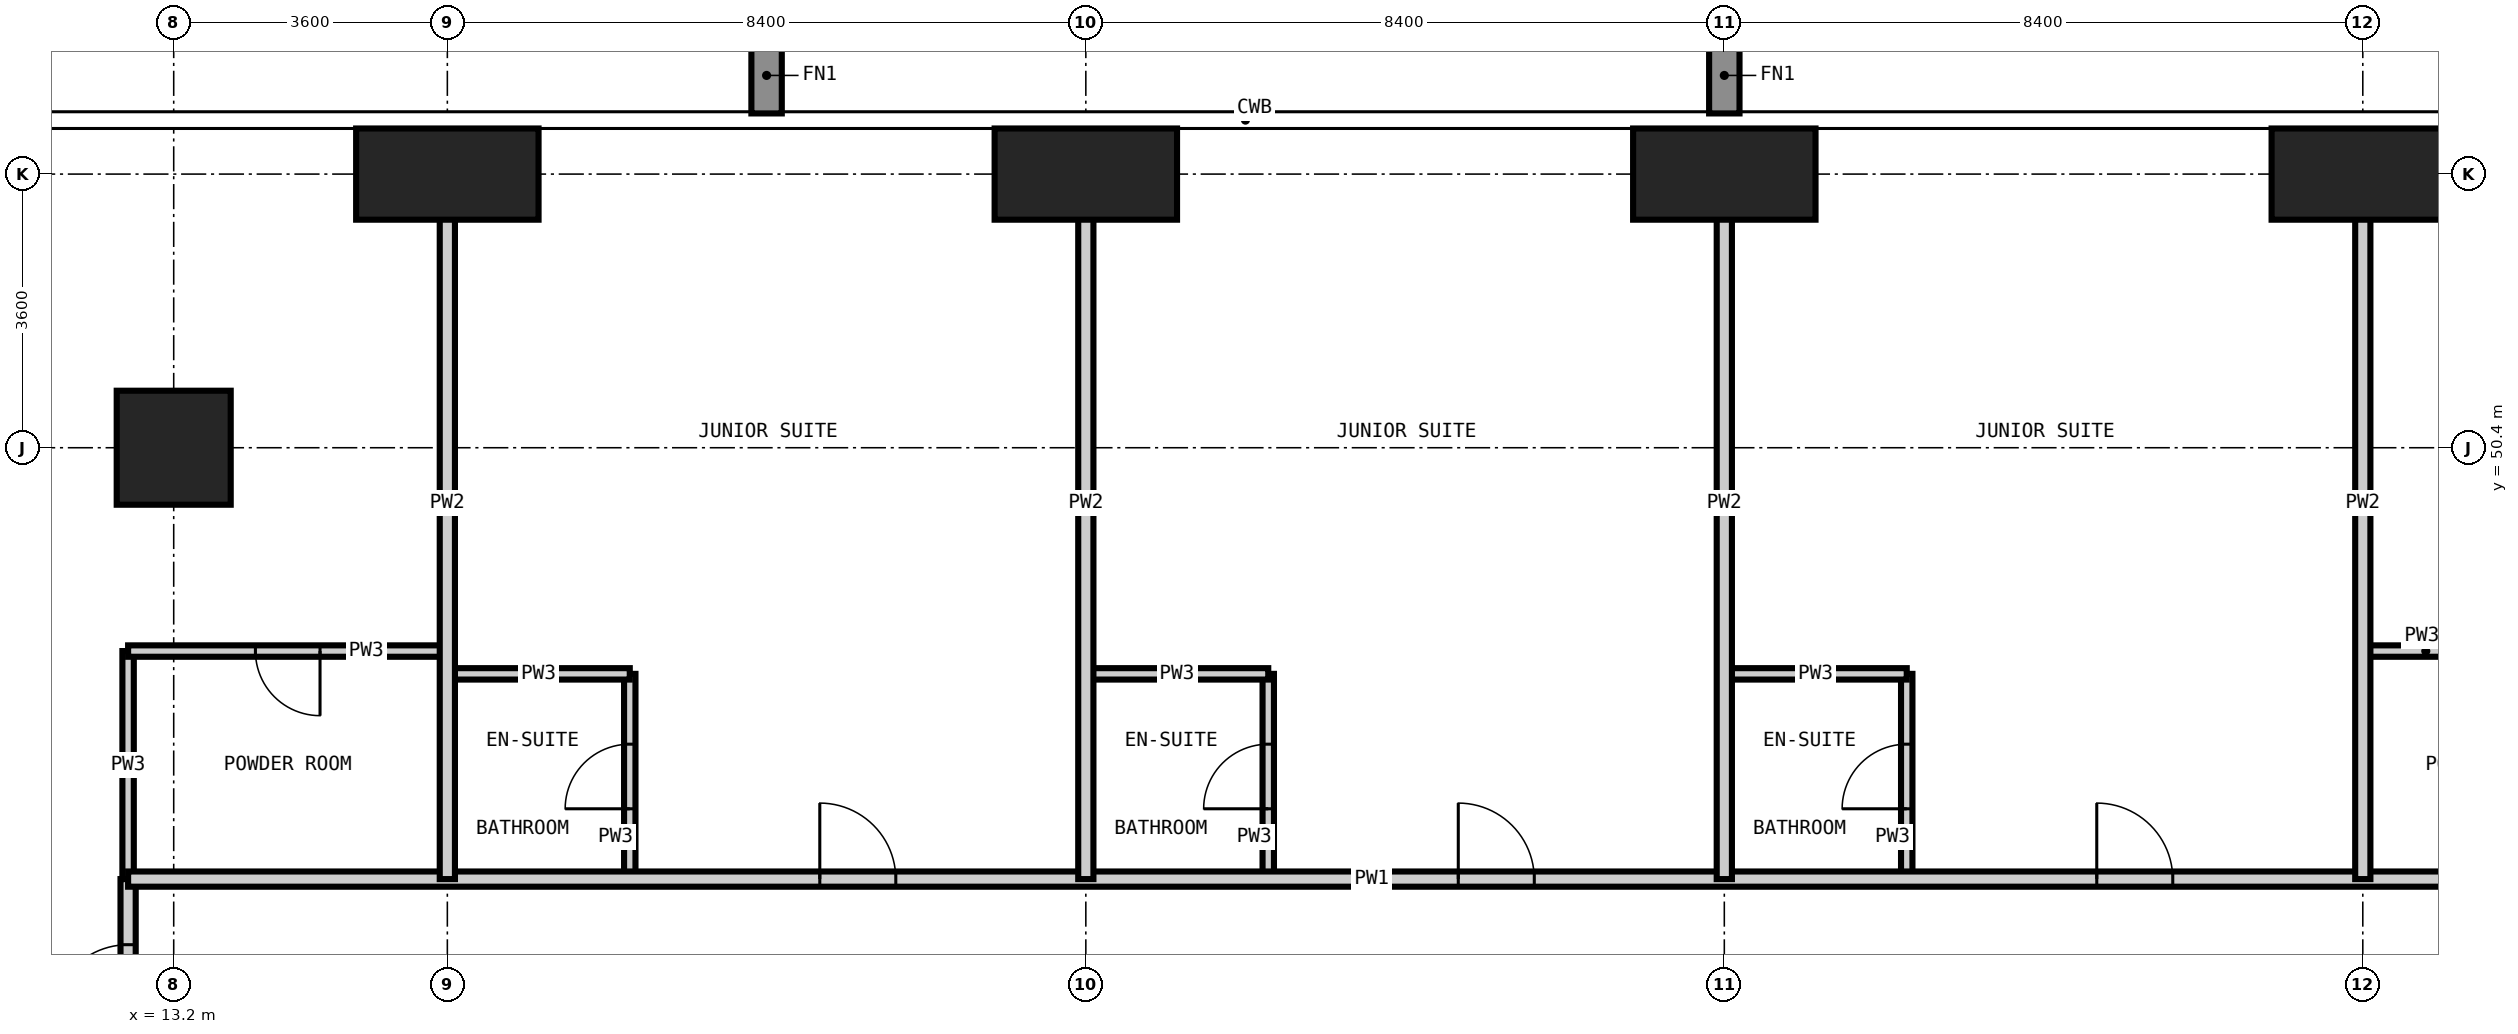
"""IFC4 building model, lengths in metres.
Left out: names, types, materials, properties, quantities, classifications, styles, units other than length and angle.
Written with IfcOpenShell. Run it as: python <this file> out.ifc"""

import sys

from ifc_helpers import new_model, si_unit, direction, frame, frame_2d, origin, origin_2d, place, context, subcontext, project, spatial, rectangle, extrude, element, fill, save


model = new_model("IFC4")
c1 = context("Model", 3, precision=1e-05, world=origin(), true_north=direction((0.0, 1.0)))
c2 = subcontext(c1, "Body", "Model", "MODEL_VIEW")
j1 = project(units=[si_unit("LENGTHUNIT", "METRE"), si_unit("PLANEANGLEUNIT", "RADIAN")], contexts=[c1])
p1 = place(None, origin())
s1 = spatial("IfcSite", under=j1, at=p1, CompositionType="ELEMENT")
p2 = place(p1, origin())
s2 = spatial("IfcBuilding", under=s1, at=p2, CompositionType="ELEMENT")
p3 = place(p2, frame((0.0, 0.0, 111.6)))
s3 = spatial("IfcBuildingStorey", under=s2, at=p3, CompositionType="ELEMENT", Elevation=111.6)
p4 = place(p3, frame((13.2, 50.4, -0.35), z_axis=(0.0, 0.0, 1.0), x_axis=(1.0, 0.0, 0.0)))
e1 = element("IfcColumn", 1, at=p4, inside=s3, PredefinedType="COLUMN", context=c2, shape_type="SweptSolid", body=[
    extrude(rectangle(XDim=1.5, YDim=1.5, at=origin_2d()), origin(), (0.0, 0.0, 1.0), 3.6),
])
for number, where, z_axis, x_axis in (
    (2, (16.8, 54.0, -0.35), (0.0, 0.0, 1.0), (1.0, 0.0, 0.0)),
    (3, (25.2, 54.0, -0.35), (0.0, 0.0, 1.0), (1.0, 0.0, 0.0)),
    (4, (33.6, 54.0, -0.35), (0.0, 0.0, 1.0), (1.0, 0.0, 0.0)),
    (5, (42.0, 54.0, -0.35), (0.0, 0.0, 1.0), (1.0, 0.0, 0.0)),
):
    element("IfcColumn", number, at=place(p3, frame(where, z_axis=z_axis, x_axis=x_axis)), inside=s3, PredefinedType="COLUMN", context=c2, shape_type="SweptSolid", body=[
        extrude(rectangle(XDim=2.4, YDim=1.2, at=origin_2d()), origin(), (0.0, 0.0, 1.0), 3.6),
    ])
p5 = place(p3, frame((12.6, 44.725, 0.0), z_axis=(0.0, 0.0, 1.0), x_axis=(0.0, 1.0, 0.0)))
e6 = element("IfcWall", 6, at=p5, inside=s3, PredefinedType="PARTITIONING", context=c2, shape_type="SweptSolid", body=[
    extrude(rectangle(XDim=3.0, YDim=0.15, at=frame_2d((1.5, 0.0))), origin(), (0.0, 0.0, 1.0), 3.25),
])
p6 = place(p3, frame((19.2, 44.725, 0.0), z_axis=(0.0, 0.0, 1.0), x_axis=(0.0, 1.0, 0.0)))
e7 = element("IfcWall", 7, at=p6, inside=s3, PredefinedType="PARTITIONING", context=c2, shape_type="SweptSolid", body=[
    extrude(rectangle(XDim=2.7, YDim=0.15, at=frame_2d((1.35, 0.0))), origin(), (0.0, 0.0, 1.0), 3.25),
])
p7 = place(p6, frame((0.925, 0.0, 0.0)))
e8 = element("IfcOpeningElement", 8, at=p7, cuts=e7, PredefinedType="OPENING", context=c2, shape_type="SweptSolid", body=[
    extrude(rectangle(XDim=0.85, YDim=2.1, at=frame_2d((0.425, 1.05))), frame((0.0, 0.085, 0.0), z_axis=(0.0, -1.0, 0.0), x_axis=(1.0, 0.0, 0.0)), (0.0, 0.0, 1.0), 0.17),
])
p8 = place(p3, frame((27.6, 44.725, 0.0), z_axis=(0.0, 0.0, 1.0), x_axis=(0.0, 1.0, 0.0)))
e9 = element("IfcWall", 9, at=p8, inside=s3, PredefinedType="PARTITIONING", context=c2, shape_type="SweptSolid", body=[
    extrude(rectangle(XDim=2.7, YDim=0.15, at=frame_2d((1.35, 0.0))), origin(), (0.0, 0.0, 1.0), 3.25),
])
p9 = place(p8, frame((0.925, 0.0, 0.0)))
e10 = element("IfcOpeningElement", 10, at=p9, cuts=e9, PredefinedType="OPENING", context=c2, shape_type="SweptSolid", body=[
    extrude(rectangle(XDim=0.85, YDim=2.1, at=frame_2d((0.425, 1.05))), frame((0.0, 0.085, 0.0), z_axis=(0.0, -1.0, 0.0), x_axis=(1.0, 0.0, 0.0)), (0.0, 0.0, 1.0), 0.17),
])
p10 = place(p3, frame((36.0, 44.725, 0.0), z_axis=(0.0, 0.0, 1.0), x_axis=(0.0, 1.0, 0.0)))
e11 = element("IfcWall", 11, at=p10, inside=s3, PredefinedType="PARTITIONING", context=c2, shape_type="SweptSolid", body=[
    extrude(rectangle(XDim=2.7, YDim=0.15, at=frame_2d((1.35, 0.0))), origin(), (0.0, 0.0, 1.0), 3.25),
])
p11 = place(p10, frame((0.925, 0.0, 0.0)))
e12 = element("IfcOpeningElement", 12, at=p11, cuts=e11, PredefinedType="OPENING", context=c2, shape_type="SweptSolid", body=[
    extrude(rectangle(XDim=0.85, YDim=2.1, at=frame_2d((0.425, 1.05))), frame((0.0, 0.085, 0.0), z_axis=(0.0, -1.0, 0.0), x_axis=(1.0, 0.0, 0.0)), (0.0, 0.0, 1.0), 0.17),
])
p12 = place(p3, frame((16.8, 47.425, 0.0), z_axis=(0.0, 0.0, 1.0), x_axis=(1.0, 0.0, 0.0)))
e13 = element("IfcWall", 13, at=p12, inside=s3, PredefinedType="PARTITIONING", context=c2, shape_type="SweptSolid", body=[
    extrude(rectangle(XDim=2.4, YDim=0.15, at=frame_2d((1.2, 0.0))), origin(), (0.0, 0.0, 1.0), 3.25),
])
p13 = place(p3, frame((25.2, 47.425, 0.0), z_axis=(0.0, 0.0, 1.0), x_axis=(1.0, 0.0, 0.0)))
e14 = element("IfcWall", 14, at=p13, inside=s3, PredefinedType="PARTITIONING", context=c2, shape_type="SweptSolid", body=[
    extrude(rectangle(XDim=2.4, YDim=0.15, at=frame_2d((1.2, 0.0))), origin(), (0.0, 0.0, 1.0), 3.25),
])
p14 = place(p3, frame((33.6, 47.425, 0.0), z_axis=(0.0, 0.0, 1.0), x_axis=(1.0, 0.0, 0.0)))
e15 = element("IfcWall", 15, at=p14, inside=s3, PredefinedType="PARTITIONING", context=c2, shape_type="SweptSolid", body=[
    extrude(rectangle(XDim=2.4, YDim=0.15, at=frame_2d((1.2, 0.0))), origin(), (0.0, 0.0, 1.0), 3.25),
])
p15 = place(p3, frame((12.6, 47.725, 0.0), z_axis=(0.0, 0.0, 1.0), x_axis=(1.0, 0.0, 0.0)))
e16 = element("IfcWall", 16, at=p15, inside=s3, PredefinedType="PARTITIONING", context=c2, shape_type="SweptSolid", body=[
    extrude(rectangle(XDim=4.2, YDim=0.15, at=frame_2d((2.1, 0.0))), origin(), (0.0, 0.0, 1.0), 3.25),
])
p16 = place(p15, frame((1.675, 0.0, 0.0)))
e17 = element("IfcOpeningElement", 17, at=p16, cuts=e16, PredefinedType="OPENING", context=c2, shape_type="SweptSolid", body=[
    extrude(rectangle(XDim=0.85, YDim=2.1, at=frame_2d((0.425, 1.05))), frame((0.0, 0.085, 0.0), z_axis=(0.0, -1.0, 0.0), x_axis=(1.0, 0.0, 0.0)), (0.0, 0.0, 1.0), 0.17),
])
p17 = place(p3, frame((42.0, 47.725, 0.0), z_axis=(0.0, 0.0, 1.0), x_axis=(1.0, 0.0, 0.0)))
e18 = element("IfcWall", 18, at=p17, inside=s3, PredefinedType="PARTITIONING", context=c2, shape_type="SweptSolid", body=[
    extrude(rectangle(XDim=3.325, YDim=0.15, at=frame_2d((1.663, 0.0))), origin(), (0.0, 0.0, 1.0), 3.25),
])
p18 = place(p17, frame((1.238, 0.0, 0.0)))
e19 = element("IfcOpeningElement", 19, at=p18, cuts=e18, PredefinedType="OPENING", context=c2, shape_type="SweptSolid", body=[
    extrude(rectangle(XDim=0.85, YDim=2.1, at=frame_2d((0.425, 1.05))), frame((0.0, 0.085, 0.0), z_axis=(0.0, -1.0, 0.0), x_axis=(1.0, 0.0, 0.0)), (0.0, 0.0, 1.0), 0.17),
])
p19 = place(p3, frame((12.6, 12.875, 0.0), z_axis=(0.0, 0.0, 1.0), x_axis=(0.0, 1.0, 0.0)))
e20 = element("IfcWall", 20, at=p19, inside=s3, PredefinedType="PARTITIONING", context=c2, shape_type="SweptSolid", body=[
    extrude(rectangle(XDim=31.85, YDim=0.2, at=frame_2d((15.925, 0.0))), origin(), (0.0, 0.0, 1.0), 3.25),
])
p20 = place(p19, frame((8.825, 0.0, 0.0)))
e21 = element("IfcOpeningElement", 21, at=p20, cuts=e20, PredefinedType="OPENING", context=c2, shape_type="SweptSolid", body=[
    extrude(rectangle(XDim=1.0, YDim=2.2, at=frame_2d((0.5, 1.1))), frame((0.0, 0.11, 0.0), z_axis=(0.0, -1.0, 0.0), x_axis=(1.0, 0.0, 0.0)), (0.0, 0.0, 1.0), 0.22),
])
p21 = place(p19, frame((17.225, 0.0, 0.0)))
e22 = element("IfcOpeningElement", 22, at=p21, cuts=e20, PredefinedType="OPENING", context=c2, shape_type="SweptSolid", body=[
    extrude(rectangle(XDim=1.0, YDim=2.2, at=frame_2d((0.5, 1.1))), frame((0.0, 0.11, 0.0), z_axis=(0.0, -1.0, 0.0), x_axis=(1.0, 0.0, 0.0)), (0.0, 0.0, 1.0), 0.22),
])
p22 = place(p19, frame((25.625, 0.0, 0.0)))
e23 = element("IfcOpeningElement", 23, at=p22, cuts=e20, PredefinedType="OPENING", context=c2, shape_type="SweptSolid", body=[
    extrude(rectangle(XDim=1.0, YDim=2.2, at=frame_2d((0.5, 1.1))), frame((0.0, 0.11, 0.0), z_axis=(0.0, -1.0, 0.0), x_axis=(1.0, 0.0, 0.0)), (0.0, 0.0, 1.0), 0.22),
])
p23 = place(p19, frame((1.463, 0.0, 0.0)))
e24 = element("IfcOpeningElement", 24, at=p23, cuts=e20, PredefinedType="OPENING", context=c2, shape_type="SweptSolid", body=[
    extrude(rectangle(XDim=1.0, YDim=2.2, at=frame_2d((0.5, 1.1))), frame((0.0, 0.11, 0.0), z_axis=(0.0, -1.0, 0.0), x_axis=(1.0, 0.0, 0.0)), (0.0, 0.0, 1.0), 0.22),
])
p24 = place(p19, frame((29.987, 0.0, 0.0)))
e25 = element("IfcOpeningElement", 25, at=p24, cuts=e20, PredefinedType="OPENING", context=c2, shape_type="SweptSolid", body=[
    extrude(rectangle(XDim=1.0, YDim=2.2, at=frame_2d((0.5, 1.1))), frame((0.0, 0.11, 0.0), z_axis=(0.0, -1.0, 0.0), x_axis=(1.0, 0.0, 0.0)), (0.0, 0.0, 1.0), 0.22),
])
p25 = place(p3, frame((12.6, 44.725, 0.0), z_axis=(0.0, 0.0, 1.0), x_axis=(1.0, 0.0, 0.0)))
e26 = element("IfcWall", 26, at=p25, inside=s3, PredefinedType="PARTITIONING", context=c2, shape_type="SweptSolid", body=[
    extrude(rectangle(XDim=32.725, YDim=0.2, at=frame_2d((16.362, 0.0))), origin(), (0.0, 0.0, 1.0), 3.25),
])
p26 = place(p25, frame((9.1, 0.0, 0.0)))
e27 = element("IfcOpeningElement", 27, at=p26, cuts=e26, PredefinedType="OPENING", context=c2, shape_type="SweptSolid", body=[
    extrude(rectangle(XDim=1.0, YDim=2.2, at=frame_2d((0.5, 1.1))), frame((0.0, 0.11, 0.0), z_axis=(0.0, -1.0, 0.0), x_axis=(1.0, 0.0, 0.0)), (0.0, 0.0, 1.0), 0.22),
])
p27 = place(p25, frame((17.5, 0.0, 0.0)))
e28 = element("IfcOpeningElement", 28, at=p27, cuts=e26, PredefinedType="OPENING", context=c2, shape_type="SweptSolid", body=[
    extrude(rectangle(XDim=1.0, YDim=2.2, at=frame_2d((0.5, 1.1))), frame((0.0, 0.11, 0.0), z_axis=(0.0, -1.0, 0.0), x_axis=(1.0, 0.0, 0.0)), (0.0, 0.0, 1.0), 0.22),
])
p28 = place(p25, frame((25.9, 0.0, 0.0)))
e29 = element("IfcOpeningElement", 29, at=p28, cuts=e26, PredefinedType="OPENING", context=c2, shape_type="SweptSolid", body=[
    extrude(rectangle(XDim=1.0, YDim=2.2, at=frame_2d((0.5, 1.1))), frame((0.0, 0.11, 0.0), z_axis=(0.0, -1.0, 0.0), x_axis=(1.0, 0.0, 0.0)), (0.0, 0.0, 1.0), 0.22),
])
for number, where, z_axis, x_axis in (
    (30, (16.8, 44.725, 0.0), (0.0, 0.0, 1.0), (0.0, 1.0, 0.0)),
    (31, (25.2, 44.725, 0.0), (0.0, 0.0, 1.0), (0.0, 1.0, 0.0)),
    (32, (33.6, 44.725, 0.0), (0.0, 0.0, 1.0), (0.0, 1.0, 0.0)),
    (33, (42.0, 44.725, 0.0), (0.0, 0.0, 1.0), (0.0, 1.0, 0.0)),
):
    element("IfcWall", number, at=place(p3, frame(where, z_axis=z_axis, x_axis=x_axis)), inside=s3, PredefinedType="PARTITIONING", context=c2, shape_type="SweptSolid", body=[
        extrude(rectangle(XDim=9.893, YDim=0.2, at=frame_2d((4.946, 0.0))), origin(), (0.0, 0.0, 1.0), 3.25),
    ])
p29 = place(p26, origin())
e34 = element("IfcDoor", 34, at=p29, inside=s3, OperationType="SINGLE_SWING_LEFT", PredefinedType="DOOR", context=c2, shape_type="SweptSolid", body=[
    extrude(rectangle(XDim=1.0, YDim=2.2, at=frame_2d((0.5, 1.1))), frame((0.0, 0.025, 0.0), z_axis=(0.0, -1.0, 0.0), x_axis=(1.0, 0.0, 0.0)), (0.0, 0.0, 1.0), 0.05),
])
fill(e27, e34)
p30 = place(p7, origin())
e35 = element("IfcDoor", 35, at=p30, inside=s3, OperationType="SINGLE_SWING_LEFT", PredefinedType="DOOR", context=c2, shape_type="SweptSolid", body=[
    extrude(rectangle(XDim=0.85, YDim=2.1, at=frame_2d((0.425, 1.05))), frame((0.0, 0.025, 0.0), z_axis=(0.0, -1.0, 0.0), x_axis=(1.0, 0.0, 0.0)), (0.0, 0.0, 1.0), 0.05),
])
fill(e8, e35)
p31 = place(p27, origin())
e36 = element("IfcDoor", 36, at=p31, inside=s3, OperationType="SINGLE_SWING_LEFT", PredefinedType="DOOR", context=c2, shape_type="SweptSolid", body=[
    extrude(rectangle(XDim=1.0, YDim=2.2, at=frame_2d((0.5, 1.1))), frame((0.0, 0.025, 0.0), z_axis=(0.0, -1.0, 0.0), x_axis=(1.0, 0.0, 0.0)), (0.0, 0.0, 1.0), 0.05),
])
fill(e28, e36)
p32 = place(p9, origin())
e37 = element("IfcDoor", 37, at=p32, inside=s3, OperationType="SINGLE_SWING_LEFT", PredefinedType="DOOR", context=c2, shape_type="SweptSolid", body=[
    extrude(rectangle(XDim=0.85, YDim=2.1, at=frame_2d((0.425, 1.05))), frame((0.0, 0.025, 0.0), z_axis=(0.0, -1.0, 0.0), x_axis=(1.0, 0.0, 0.0)), (0.0, 0.0, 1.0), 0.05),
])
fill(e10, e37)
p33 = place(p28, origin())
e38 = element("IfcDoor", 38, at=p33, inside=s3, OperationType="SINGLE_SWING_LEFT", PredefinedType="DOOR", context=c2, shape_type="SweptSolid", body=[
    extrude(rectangle(XDim=1.0, YDim=2.2, at=frame_2d((0.5, 1.1))), frame((0.0, 0.025, 0.0), z_axis=(0.0, -1.0, 0.0), x_axis=(1.0, 0.0, 0.0)), (0.0, 0.0, 1.0), 0.05),
])
fill(e29, e38)
p34 = place(p11, origin())
e39 = element("IfcDoor", 39, at=p34, inside=s3, OperationType="SINGLE_SWING_LEFT", PredefinedType="DOOR", context=c2, shape_type="SweptSolid", body=[
    extrude(rectangle(XDim=0.85, YDim=2.1, at=frame_2d((0.425, 1.05))), frame((0.0, 0.025, 0.0), z_axis=(0.0, -1.0, 0.0), x_axis=(1.0, 0.0, 0.0)), (0.0, 0.0, 1.0), 0.05),
])
fill(e12, e39)
p35 = place(p24, origin())
e40 = element("IfcDoor", 40, at=p35, inside=s3, OperationType="SINGLE_SWING_LEFT", PredefinedType="DOOR", context=c2, shape_type="SweptSolid", body=[
    extrude(rectangle(XDim=1.0, YDim=2.2, at=frame_2d((0.5, 1.1))), frame((0.0, 0.025, 0.0), z_axis=(0.0, -1.0, 0.0), x_axis=(1.0, 0.0, 0.0)), (0.0, 0.0, 1.0), 0.05),
])
fill(e25, e40)
p36 = place(p16, frame((0.85, 0.0, 0.0), z_axis=(0.0, 0.0, 1.0), x_axis=(-1.0, 0.0, 0.0)))
e41 = element("IfcDoor", 41, at=p36, inside=s3, OperationType="SINGLE_SWING_LEFT", PredefinedType="DOOR", context=c2, shape_type="SweptSolid", body=[
    extrude(rectangle(XDim=0.85, YDim=2.1, at=frame_2d((0.425, 1.05))), frame((0.0, 0.025, 0.0), z_axis=(0.0, -1.0, 0.0), x_axis=(1.0, 0.0, 0.0)), (0.0, 0.0, 1.0), 0.05),
])
fill(e17, e41)
save(model, sys.argv[1])
